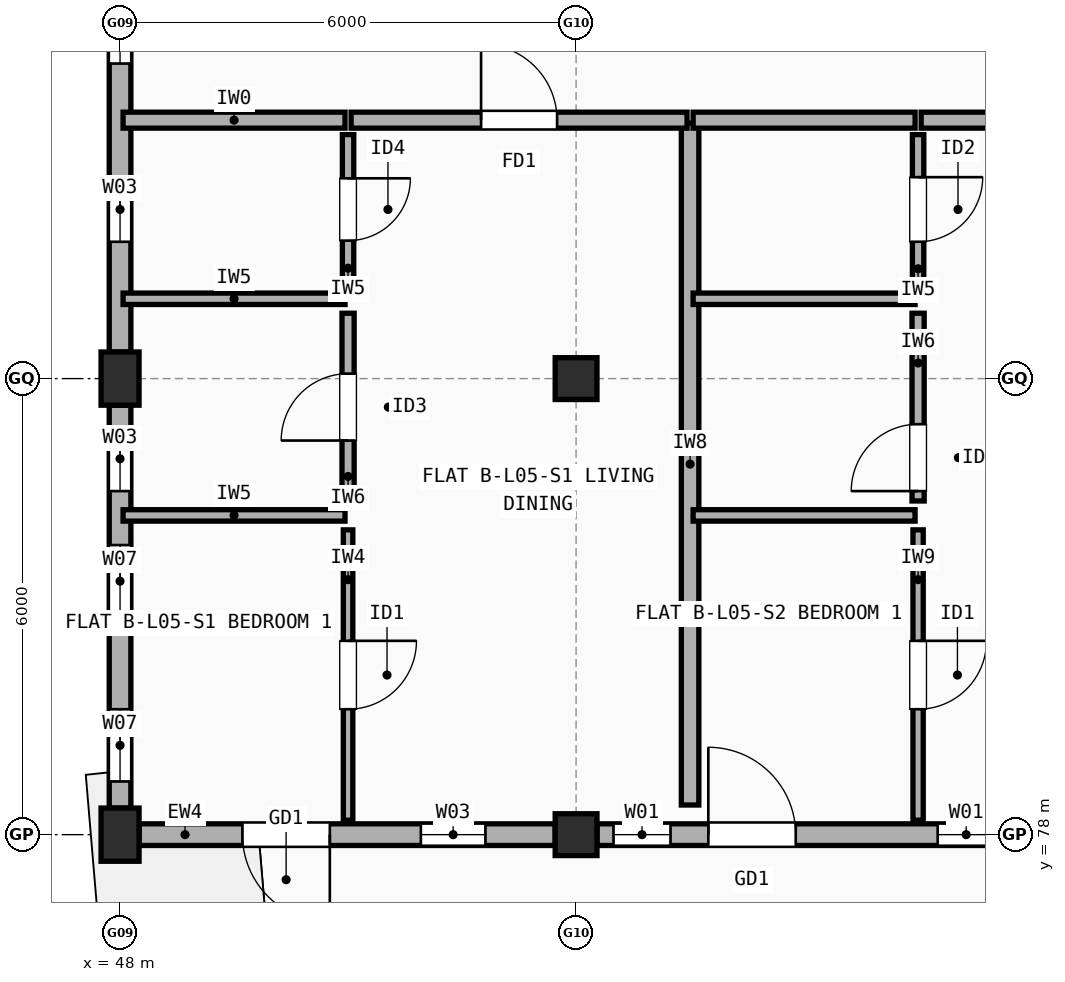
"""IFC4 building model, lengths in metres.
Left out: names, types, materials, properties, quantities, classifications, styles, units other than length and angle.
Written with IfcOpenShell. Run it as: python <this file> out.ifc"""

import sys

from ifc_helpers import new_model, si_unit, direction, frame, frame_2d, origin, origin_2d, place, context, subcontext, project, spatial, rectangle, extrude, element, fill, save


model = new_model("IFC4")
c1 = context("Model", 3, precision=1e-05, world=origin(), true_north=direction((0.0, 1.0)))
c2 = subcontext(c1, "Body", "Model", "MODEL_VIEW")
j1 = project(units=[si_unit("LENGTHUNIT", "METRE"), si_unit("PLANEANGLEUNIT", "RADIAN")], contexts=[c1])
p1 = place(None, origin())
s1 = spatial("IfcSite", under=j1, at=p1, CompositionType="ELEMENT")
p2 = place(p1, origin())
s2 = spatial("IfcBuilding", under=s1, at=p2, CompositionType="ELEMENT")
p3 = place(p2, frame((0.0, 0.0, 17.3)))
s3 = spatial("IfcBuildingStorey", under=s2, at=p3, CompositionType="ELEMENT", Elevation=17.3)
for number, where, z_axis, x_axis in (
    (1, (48.0, 78.0, 0.0), (0.0, 0.0, 1.0), (1.0, 0.0, 0.0)),
    (2, (48.0, 84.0, 0.0), (0.0, 0.0, 1.0), (1.0, 0.0, 0.0)),
):
    element("IfcColumn", number, at=place(p3, frame(where, z_axis=z_axis, x_axis=x_axis)), inside=s3, PredefinedType="COLUMN", context=c2, shape_type="SweptSolid", body=[
        extrude(rectangle(XDim=0.5, YDim=0.7, at=origin_2d()), origin(), (0.0, 0.0, 1.0), 2.965),
    ])
for number, where, z_axis, x_axis in (
    (3, (54.0, 78.0, 0.0), (0.0, 0.0, 1.0), (1.0, 0.0, 0.0)),
    (4, (54.0, 84.0, 0.0), (0.0, 0.0, 1.0), (1.0, 0.0, 0.0)),
):
    element("IfcColumn", number, at=place(p3, frame(where, z_axis=z_axis, x_axis=x_axis)), inside=s3, PredefinedType="COLUMN", context=c2, shape_type="SweptSolid", body=[
        extrude(rectangle(XDim=0.55, YDim=0.55, at=origin_2d()), origin(), (0.0, 0.0, 1.0), 2.965),
    ])
p4 = place(p3, frame((48.25, 78.0, 0.0), z_axis=(0.0, 0.0, 1.0), x_axis=(1.0, 0.0, 0.0)))
e5 = element("IfcWall", 5, at=p4, inside=s3, PredefinedType="STANDARD", context=c2, shape_type="SweptSolid", body=[
    extrude(rectangle(XDim=5.475, YDim=0.285, at=frame_2d((2.738, 0.0))), origin(), (0.0, 0.0, 1.0), 2.447),
])
p5 = place(p4, frame((1.36, 0.0, 0.0)))
e6 = element("IfcOpeningElement", 6, at=p5, cuts=e5, PredefinedType="OPENING", context=c2, shape_type="SweptSolid", body=[
    extrude(rectangle(XDim=1.15, YDim=2.15, at=frame_2d((0.575, 1.075))), frame((0.0, 0.152, 0.0), z_axis=(0.0, -1.0, 0.0), x_axis=(1.0, 0.0, 0.0)), (0.0, 0.0, 1.0), 0.305),
])
p6 = place(p4, frame((3.708, 0.0, 0.9)))
e7 = element("IfcOpeningElement", 7, at=p6, cuts=e5, PredefinedType="OPENING", context=c2, shape_type="SweptSolid", body=[
    extrude(rectangle(XDim=0.85, YDim=1.25, at=frame_2d((0.425, 0.625))), frame((0.0, 0.152, 0.0), z_axis=(0.0, -1.0, 0.0), x_axis=(1.0, 0.0, 0.0)), (0.0, 0.0, 1.0), 0.305),
])
p7 = place(p3, frame((54.275, 78.0, 0.0), z_axis=(0.0, 0.0, 1.0), x_axis=(1.0, 0.0, 0.0)))
e8 = element("IfcWall", 8, at=p7, inside=s3, PredefinedType="STANDARD", context=c2, shape_type="SweptSolid", body=[
    extrude(rectangle(XDim=5.45, YDim=0.285, at=frame_2d((2.725, 0.0))), origin(), (0.0, 0.0, 1.0), 2.447),
])
p8 = place(p7, frame((1.465, 0.0, 0.0)))
e9 = element("IfcOpeningElement", 9, at=p8, cuts=e8, PredefinedType="OPENING", context=c2, shape_type="SweptSolid", body=[
    extrude(rectangle(XDim=1.15, YDim=2.15, at=frame_2d((0.575, 1.075))), frame((0.0, 0.152, 0.0), z_axis=(0.0, -1.0, 0.0), x_axis=(1.0, 0.0, 0.0)), (0.0, 0.0, 1.0), 0.305),
])
p9 = place(p7, frame((0.218, 0.0, 0.9)))
e10 = element("IfcOpeningElement", 10, at=p9, cuts=e8, PredefinedType="OPENING", context=c2, shape_type="SweptSolid", body=[
    extrude(rectangle(XDim=0.75, YDim=1.15, at=frame_2d((0.375, 0.575))), frame((0.0, 0.152, 0.0), z_axis=(0.0, -1.0, 0.0), x_axis=(1.0, 0.0, 0.0)), (0.0, 0.0, 1.0), 0.305),
])
p10 = place(p7, frame((4.482, 0.0, 0.9)))
e11 = element("IfcOpeningElement", 11, at=p10, cuts=e8, PredefinedType="OPENING", context=c2, shape_type="SweptSolid", body=[
    extrude(rectangle(XDim=0.75, YDim=1.15, at=frame_2d((0.375, 0.575))), frame((0.0, 0.152, 0.0), z_axis=(0.0, -1.0, 0.0), x_axis=(1.0, 0.0, 0.0)), (0.0, 0.0, 1.0), 0.305),
])
p11 = place(p3, frame((48.0, 89.65, 0.0), z_axis=(0.0, 0.0, 1.0), x_axis=(0.0, -1.0, 0.0)))
e12 = element("IfcWall", 12, at=p11, inside=s3, PredefinedType="STANDARD", context=c2, shape_type="SweptSolid", body=[
    extrude(rectangle(XDim=5.3, YDim=0.285, at=frame_2d((2.65, 0.0))), origin(), (0.0, 0.0, 1.0), 2.447),
])
p12 = place(p11, frame((0.705, 0.0, 0.9)))
e13 = element("IfcOpeningElement", 13, at=p12, cuts=e12, PredefinedType="OPENING", context=c2, shape_type="SweptSolid", body=[
    extrude(rectangle(XDim=0.8, YDim=1.2, at=frame_2d((0.4, 0.6))), frame((0.0, 0.152, 0.0), z_axis=(0.0, -1.0, 0.0), x_axis=(1.0, 0.0, 0.0)), (0.0, 0.0, 1.0), 0.305),
])
p13 = place(p11, frame((3.0, 0.0, 0.9)))
e14 = element("IfcOpeningElement", 14, at=p13, cuts=e12, PredefinedType="OPENING", context=c2, shape_type="SweptSolid", body=[
    extrude(rectangle(XDim=0.85, YDim=1.25, at=frame_2d((0.425, 0.625))), frame((0.0, 0.152, 0.0), z_axis=(0.0, -1.0, 0.0), x_axis=(1.0, 0.0, 0.0)), (0.0, 0.0, 1.0), 0.305),
])
p14 = place(p3, frame((48.0, 83.65, 0.0), z_axis=(0.0, 0.0, 1.0), x_axis=(0.0, -1.0, 0.0)))
e15 = element("IfcWall", 15, at=p14, inside=s3, PredefinedType="STANDARD", context=c2, shape_type="SweptSolid", body=[
    extrude(rectangle(XDim=5.3, YDim=0.285, at=frame_2d((2.65, 0.0))), origin(), (0.0, 0.0, 1.0), 2.447),
])
p15 = place(p14, frame((0.28, 0.0, 0.9)))
e16 = element("IfcOpeningElement", 16, at=p15, cuts=e15, PredefinedType="OPENING", context=c2, shape_type="SweptSolid", body=[
    extrude(rectangle(XDim=0.85, YDim=1.25, at=frame_2d((0.425, 0.625))), frame((0.0, 0.152, 0.0), z_axis=(0.0, -1.0, 0.0), x_axis=(1.0, 0.0, 0.0)), (0.0, 0.0, 1.0), 0.305),
])
p16 = place(p14, frame((1.84, 0.0, 0.9)))
e17 = element("IfcOpeningElement", 17, at=p16, cuts=e15, PredefinedType="OPENING", context=c2, shape_type="SweptSolid", body=[
    extrude(rectangle(XDim=0.95, YDim=1.35, at=frame_2d((0.475, 0.675))), frame((0.0, 0.152, 0.0), z_axis=(0.0, -1.0, 0.0), x_axis=(1.0, 0.0, 0.0)), (0.0, 0.0, 1.0), 0.305),
])
p17 = place(p14, frame((4.0, 0.0, 0.9)))
e18 = element("IfcOpeningElement", 18, at=p17, cuts=e15, PredefinedType="OPENING", context=c2, shape_type="SweptSolid", body=[
    extrude(rectangle(XDim=0.95, YDim=1.35, at=frame_2d((0.475, 0.675))), frame((0.0, 0.152, 0.0), z_axis=(0.0, -1.0, 0.0), x_axis=(1.0, 0.0, 0.0)), (0.0, 0.0, 1.0), 0.305),
])
p18 = place(p3, frame((55.5, 78.39, 0.0), z_axis=(0.0, 0.0, 1.0), x_axis=(0.0, 1.0, 0.0)))
e19 = element("IfcWall", 19, at=p18, inside=s3, PredefinedType="SOLIDWALL", context=c2, shape_type="SweptSolid", body=[
    extrude(rectangle(XDim=8.97, YDim=0.23, at=frame_2d((4.485, 0.0))), origin(), (0.0, 0.0, 1.0), 2.447),
])
p19 = place(p3, frame((48.04, 87.4, 0.0), z_axis=(0.0, 0.0, 1.0), x_axis=(1.0, 0.0, 0.0)))
e20 = element("IfcWall", 20, at=p19, inside=s3, PredefinedType="SOLIDWALL", context=c2, shape_type="SweptSolid", body=[
    extrude(rectangle(XDim=2.92, YDim=0.21, at=frame_2d((1.46, 0.0))), origin(), (0.0, 0.0, 1.0), 2.447),
])
p20 = place(p3, frame((51.04, 87.4, 0.0), z_axis=(0.0, 0.0, 1.0), x_axis=(1.0, 0.0, 0.0)))
e21 = element("IfcWall", 21, at=p20, inside=s3, PredefinedType="SOLIDWALL", context=c2, shape_type="SweptSolid", body=[
    extrude(rectangle(XDim=4.42, YDim=0.21, at=frame_2d((2.21, 0.0))), origin(), (0.0, 0.0, 1.0), 2.548),
])
p21 = place(p20, frame((1.71, 0.0, 0.0)))
e22 = element("IfcOpeningElement", 22, at=p21, cuts=e21, PredefinedType="OPENING", context=c2, shape_type="SweptSolid", body=[
    extrude(rectangle(XDim=1.0, YDim=2.15, at=frame_2d((0.5, 1.075))), frame((0.0, 0.115, 0.0), z_axis=(0.0, -1.0, 0.0), x_axis=(1.0, 0.0, 0.0)), (0.0, 0.0, 1.0), 0.23),
])
p22 = place(p3, frame((51.0, 78.19, 0.0), z_axis=(0.0, 0.0, 1.0), x_axis=(0.0, 1.0, 0.0)))
e23 = element("IfcWall", 23, at=p22, inside=s3, PredefinedType="PARTITIONING", context=c2, shape_type="SweptSolid", body=[
    extrude(rectangle(XDim=3.82, YDim=0.125, at=frame_2d((1.91, 0.0))), origin(), (0.0, 0.0, 1.0), 2.965),
])
p23 = place(p22, frame((1.46, 0.0, 0.0)))
e24 = element("IfcOpeningElement", 24, at=p23, cuts=e23, PredefinedType="OPENING", context=c2, shape_type="SweptSolid", body=[
    extrude(rectangle(XDim=0.9, YDim=2.1, at=frame_2d((0.45, 1.05))), frame((0.0, 0.073, 0.0), z_axis=(0.0, -1.0, 0.0), x_axis=(1.0, 0.0, 0.0)), (0.0, 0.0, 1.0), 0.145),
])
p24 = place(p3, frame((51.0, 82.39, 0.0), z_axis=(0.0, 0.0, 1.0), x_axis=(0.0, 1.0, 0.0)))
e25 = element("IfcWall", 25, at=p24, inside=s3, PredefinedType="PLUMBINGWALL", context=c2, shape_type="SweptSolid", body=[
    extrude(rectangle(XDim=2.47, YDim=0.16, at=frame_2d((1.235, 0.0))), origin(), (0.0, 0.0, 1.0), 2.447),
])
p25 = place(p24, frame((0.795, 0.0, 0.0)))
e26 = element("IfcOpeningElement", 26, at=p25, cuts=e25, PredefinedType="OPENING", context=c2, shape_type="SweptSolid", body=[
    extrude(rectangle(XDim=0.88, YDim=2.1, at=frame_2d((0.44, 1.05))), frame((0.0, 0.09, 0.0), z_axis=(0.0, -1.0, 0.0), x_axis=(1.0, 0.0, 0.0)), (0.0, 0.0, 1.0), 0.18),
])
p26 = place(p3, frame((51.0, 85.24, 0.0), z_axis=(0.0, 0.0, 1.0), x_axis=(0.0, 1.0, 0.0)))
e27 = element("IfcWall", 27, at=p26, inside=s3, PredefinedType="PARTITIONING", context=c2, shape_type="SweptSolid", body=[
    extrude(rectangle(XDim=1.97, YDim=0.15, at=frame_2d((0.985, 0.0))), origin(), (0.0, 0.0, 1.0), 2.965),
])
p27 = place(p26, frame((0.575, 0.0, 0.0)))
e28 = element("IfcOpeningElement", 28, at=p27, cuts=e27, PredefinedType="OPENING", context=c2, shape_type="SweptSolid", body=[
    extrude(rectangle(XDim=0.82, YDim=2.08, at=frame_2d((0.41, 1.04))), frame((0.0, 0.085, 0.0), z_axis=(0.0, -1.0, 0.0), x_axis=(1.0, 0.0, 0.0)), (0.0, 0.0, 1.0), 0.17),
])
for number, where, z_axis, x_axis in (
    (29, (48.04, 82.2, 0.0), (0.0, 0.0, 1.0), (1.0, 0.0, 0.0)),
    (30, (48.04, 85.05, 0.0), (0.0, 0.0, 1.0), (1.0, 0.0, 0.0)),
):
    element("IfcWall", number, at=place(p3, frame(where, z_axis=z_axis, x_axis=x_axis)), inside=s3, PredefinedType="PARTITIONING", context=c2, shape_type="SweptSolid", body=[
        extrude(rectangle(XDim=2.92, YDim=0.15, at=frame_2d((1.46, 0.0))), origin(), (0.0, 0.0, 1.0), 2.447),
    ])
p28 = place(p3, frame((55.54, 87.4, 0.0), z_axis=(0.0, 0.0, 1.0), x_axis=(1.0, 0.0, 0.0)))
e31 = element("IfcWall", 31, at=p28, inside=s3, PredefinedType="SOLIDWALL", context=c2, shape_type="SweptSolid", body=[
    extrude(rectangle(XDim=2.92, YDim=0.21, at=frame_2d((1.46, 0.0))), origin(), (0.0, 0.0, 1.0), 2.965),
])
p29 = place(p3, frame((58.54, 87.4, 0.0), z_axis=(0.0, 0.0, 1.0), x_axis=(1.0, 0.0, 0.0)))
e32 = element("IfcWall", 32, at=p29, inside=s3, PredefinedType="SOLIDWALL", context=c2, shape_type="SweptSolid", body=[
    extrude(rectangle(XDim=4.42, YDim=0.21, at=frame_2d((2.21, 0.0))), origin(), (0.0, 0.0, 1.0), 2.508),
])
p30 = place(p29, frame((1.72, 0.0, 0.0)))
e33 = element("IfcOpeningElement", 33, at=p30, cuts=e32, PredefinedType="OPENING", context=c2, shape_type="SweptSolid", body=[
    extrude(rectangle(XDim=0.98, YDim=2.15, at=frame_2d((0.49, 1.075))), frame((0.0, 0.115, 0.0), z_axis=(0.0, -1.0, 0.0), x_axis=(1.0, 0.0, 0.0)), (0.0, 0.0, 1.0), 0.23),
])
p31 = place(p3, frame((58.5, 78.19, 0.0), z_axis=(0.0, 0.0, 1.0), x_axis=(0.0, 1.0, 0.0)))
e34 = element("IfcWall", 34, at=p31, inside=s3, PredefinedType="PARTITIONING", context=c2, shape_type="SweptSolid", body=[
    extrude(rectangle(XDim=3.82, YDim=0.135, at=frame_2d((1.91, 0.0))), origin(), (0.0, 0.0, 1.0), 2.965),
])
p32 = place(p31, frame((1.46, 0.0, 0.0)))
e35 = element("IfcOpeningElement", 35, at=p32, cuts=e34, PredefinedType="OPENING", context=c2, shape_type="SweptSolid", body=[
    extrude(rectangle(XDim=0.9, YDim=2.1, at=frame_2d((0.45, 1.05))), frame((0.0, 0.077, 0.0), z_axis=(0.0, -1.0, 0.0), x_axis=(1.0, 0.0, 0.0)), (0.0, 0.0, 1.0), 0.155),
])
p33 = place(p3, frame((58.5, 82.39, 0.0), z_axis=(0.0, 0.0, 1.0), x_axis=(0.0, 1.0, 0.0)))
e36 = element("IfcWall", 36, at=p33, inside=s3, PredefinedType="PLUMBINGWALL", context=c2, shape_type="SweptSolid", body=[
    extrude(rectangle(XDim=2.47, YDim=0.16, at=frame_2d((1.235, 0.0))), origin(), (0.0, 0.0, 1.0), 2.447),
])
p34 = place(p33, frame((0.13, 0.0, 0.0)))
e37 = element("IfcOpeningElement", 37, at=p34, cuts=e36, PredefinedType="OPENING", context=c2, shape_type="SweptSolid", body=[
    extrude(rectangle(XDim=0.88, YDim=2.1, at=frame_2d((0.44, 1.05))), frame((0.0, 0.09, 0.0), z_axis=(0.0, -1.0, 0.0), x_axis=(1.0, 0.0, 0.0)), (0.0, 0.0, 1.0), 0.18),
])
p35 = place(p3, frame((58.5, 85.24, 0.0), z_axis=(0.0, 0.0, 1.0), x_axis=(0.0, 1.0, 0.0)))
e38 = element("IfcWall", 38, at=p35, inside=s3, PredefinedType="PARTITIONING", context=c2, shape_type="SweptSolid", body=[
    extrude(rectangle(XDim=1.97, YDim=0.15, at=frame_2d((0.985, 0.0))), origin(), (0.0, 0.0, 1.0), 2.965),
])
p36 = place(p35, frame((0.56, 0.0, 0.0)))
e39 = element("IfcOpeningElement", 39, at=p36, cuts=e38, PredefinedType="OPENING", context=c2, shape_type="SweptSolid", body=[
    extrude(rectangle(XDim=0.85, YDim=2.1, at=frame_2d((0.425, 1.05))), frame((0.0, 0.085, 0.0), z_axis=(0.0, -1.0, 0.0), x_axis=(1.0, 0.0, 0.0)), (0.0, 0.0, 1.0), 0.17),
])
for number, where, z_axis, x_axis in (
    (40, (55.54, 82.2, 0.0), (0.0, 0.0, 1.0), (1.0, 0.0, 0.0)),
    (41, (55.54, 85.05, 0.0), (0.0, 0.0, 1.0), (1.0, 0.0, 0.0)),
):
    element("IfcWall", number, at=place(p3, frame(where, z_axis=z_axis, x_axis=x_axis)), inside=s3, PredefinedType="PARTITIONING", context=c2, shape_type="SweptSolid", body=[
        extrude(rectangle(XDim=2.92, YDim=0.15, at=frame_2d((1.46, 0.0))), origin(), (0.0, 0.0, 1.0), 2.965),
    ])
p37 = place(p5, frame((1.15, 0.0, 0.0), z_axis=(0.0, 0.0, 1.0), x_axis=(-1.0, 0.0, 0.0)))
e42 = element("IfcDoor", 42, at=p37, inside=s3, OperationType="SINGLE_SWING_RIGHT", PredefinedType="DOOR", context=c2, shape_type="SweptSolid", body=[
    extrude(rectangle(XDim=1.15, YDim=2.15, at=frame_2d((0.575, 1.075))), frame((0.0, 0.025, 0.0), z_axis=(0.0, -1.0, 0.0), x_axis=(1.0, 0.0, 0.0)), (0.0, 0.0, 1.0), 0.05),
])
fill(e6, e42)
p38 = place(p6, origin())
e43 = element("IfcWindow", 43, at=p38, inside=s3, PartitioningType="SINGLE_PANEL", PredefinedType="WINDOW", context=c2, shape_type="SweptSolid", body=[
    extrude(rectangle(XDim=0.85, YDim=1.25, at=frame_2d((0.425, 0.625))), frame((0.0, 0.03, 0.0), z_axis=(0.0, -1.0, 0.0), x_axis=(1.0, 0.0, 0.0)), (0.0, 0.0, 1.0), 0.06),
])
fill(e7, e43)
p39 = place(p8, frame((1.15, 0.0, 0.0), z_axis=(0.0, 0.0, 1.0), x_axis=(-1.0, 0.0, 0.0)))
e44 = element("IfcDoor", 44, at=p39, inside=s3, OperationType="SINGLE_SWING_LEFT", PredefinedType="DOOR", context=c2, shape_type="SweptSolid", body=[
    extrude(rectangle(XDim=1.15, YDim=2.15, at=frame_2d((0.575, 1.075))), frame((0.0, 0.025, 0.0), z_axis=(0.0, -1.0, 0.0), x_axis=(1.0, 0.0, 0.0)), (0.0, 0.0, 1.0), 0.05),
])
fill(e9, e44)
p40 = place(p9, origin())
e45 = element("IfcWindow", 45, at=p40, inside=s3, PartitioningType="SINGLE_PANEL", PredefinedType="WINDOW", context=c2, shape_type="SweptSolid", body=[
    extrude(rectangle(XDim=0.75, YDim=1.15, at=frame_2d((0.375, 0.575))), frame((0.0, 0.03, 0.0), z_axis=(0.0, -1.0, 0.0), x_axis=(1.0, 0.0, 0.0)), (0.0, 0.0, 1.0), 0.06),
])
fill(e10, e45)
p41 = place(p10, origin())
e46 = element("IfcWindow", 46, at=p41, inside=s3, PartitioningType="SINGLE_PANEL", PredefinedType="WINDOW", context=c2, shape_type="SweptSolid", body=[
    extrude(rectangle(XDim=0.75, YDim=1.15, at=frame_2d((0.375, 0.575))), frame((0.0, 0.03, 0.0), z_axis=(0.0, -1.0, 0.0), x_axis=(1.0, 0.0, 0.0)), (0.0, 0.0, 1.0), 0.06),
])
fill(e11, e46)
p42 = place(p12, origin())
e47 = element("IfcWindow", 47, at=p42, inside=s3, PartitioningType="SINGLE_PANEL", PredefinedType="WINDOW", context=c2, shape_type="SweptSolid", body=[
    extrude(rectangle(XDim=0.8, YDim=1.2, at=frame_2d((0.4, 0.6))), frame((0.0, 0.03, 0.0), z_axis=(0.0, -1.0, 0.0), x_axis=(1.0, 0.0, 0.0)), (0.0, 0.0, 1.0), 0.06),
])
fill(e13, e47)
p43 = place(p13, origin())
e48 = element("IfcWindow", 48, at=p43, inside=s3, PartitioningType="SINGLE_PANEL", PredefinedType="WINDOW", context=c2, shape_type="SweptSolid", body=[
    extrude(rectangle(XDim=0.85, YDim=1.25, at=frame_2d((0.425, 0.625))), frame((0.0, 0.03, 0.0), z_axis=(0.0, -1.0, 0.0), x_axis=(1.0, 0.0, 0.0)), (0.0, 0.0, 1.0), 0.06),
])
fill(e14, e48)
p44 = place(p15, origin())
e49 = element("IfcWindow", 49, at=p44, inside=s3, PartitioningType="SINGLE_PANEL", PredefinedType="WINDOW", context=c2, shape_type="SweptSolid", body=[
    extrude(rectangle(XDim=0.85, YDim=1.25, at=frame_2d((0.425, 0.625))), frame((0.0, 0.03, 0.0), z_axis=(0.0, -1.0, 0.0), x_axis=(1.0, 0.0, 0.0)), (0.0, 0.0, 1.0), 0.06),
])
fill(e16, e49)
p45 = place(p16, origin())
e50 = element("IfcWindow", 50, at=p45, inside=s3, PartitioningType="SINGLE_PANEL", PredefinedType="WINDOW", context=c2, shape_type="SweptSolid", body=[
    extrude(rectangle(XDim=0.95, YDim=1.35, at=frame_2d((0.475, 0.675))), frame((0.0, 0.03, 0.0), z_axis=(0.0, -1.0, 0.0), x_axis=(1.0, 0.0, 0.0)), (0.0, 0.0, 1.0), 0.06),
])
fill(e17, e50)
p46 = place(p17, origin())
e51 = element("IfcWindow", 51, at=p46, inside=s3, PartitioningType="SINGLE_PANEL", PredefinedType="WINDOW", context=c2, shape_type="SweptSolid", body=[
    extrude(rectangle(XDim=0.95, YDim=1.35, at=frame_2d((0.475, 0.675))), frame((0.0, 0.03, 0.0), z_axis=(0.0, -1.0, 0.0), x_axis=(1.0, 0.0, 0.0)), (0.0, 0.0, 1.0), 0.06),
])
fill(e18, e51)
p47 = place(p21, origin())
e52 = element("IfcDoor", 52, at=p47, inside=s3, OperationType="SINGLE_SWING_LEFT", PredefinedType="DOOR", context=c2, shape_type="SweptSolid", body=[
    extrude(rectangle(XDim=1.0, YDim=2.15, at=frame_2d((0.5, 1.075))), frame((0.0, 0.025, 0.0), z_axis=(0.0, -1.0, 0.0), x_axis=(1.0, 0.0, 0.0)), (0.0, 0.0, 1.0), 0.05),
])
fill(e22, e52)
p48 = place(p23, origin())
e53 = element("IfcDoor", 53, at=p48, inside=s3, OperationType="SINGLE_SWING_RIGHT", PredefinedType="DOOR", context=c2, shape_type="SweptSolid", body=[
    extrude(rectangle(XDim=0.9, YDim=2.1, at=frame_2d((0.45, 1.05))), frame((0.0, 0.025, 0.0), z_axis=(0.0, -1.0, 0.0), x_axis=(1.0, 0.0, 0.0)), (0.0, 0.0, 1.0), 0.05),
])
fill(e24, e53)
p49 = place(p25, origin())
e54 = element("IfcDoor", 54, at=p49, inside=s3, OperationType="SINGLE_SWING_LEFT", PredefinedType="DOOR", context=c2, shape_type="SweptSolid", body=[
    extrude(rectangle(XDim=0.88, YDim=2.1, at=frame_2d((0.44, 1.05))), frame((0.0, 0.025, 0.0), z_axis=(0.0, -1.0, 0.0), x_axis=(1.0, 0.0, 0.0)), (0.0, 0.0, 1.0), 0.05),
])
fill(e26, e54)
p50 = place(p27, origin())
e55 = element("IfcDoor", 55, at=p50, inside=s3, OperationType="SINGLE_SWING_RIGHT", PredefinedType="DOOR", context=c2, shape_type="SweptSolid", body=[
    extrude(rectangle(XDim=0.82, YDim=2.08, at=frame_2d((0.41, 1.04))), frame((0.0, 0.025, 0.0), z_axis=(0.0, -1.0, 0.0), x_axis=(1.0, 0.0, 0.0)), (0.0, 0.0, 1.0), 0.05),
])
fill(e28, e55)
p51 = place(p32, origin())
e56 = element("IfcDoor", 56, at=p51, inside=s3, OperationType="SINGLE_SWING_RIGHT", PredefinedType="DOOR", context=c2, shape_type="SweptSolid", body=[
    extrude(rectangle(XDim=0.9, YDim=2.1, at=frame_2d((0.45, 1.05))), frame((0.0, 0.025, 0.0), z_axis=(0.0, -1.0, 0.0), x_axis=(1.0, 0.0, 0.0)), (0.0, 0.0, 1.0), 0.05),
])
fill(e35, e56)
p52 = place(p34, origin())
e57 = element("IfcDoor", 57, at=p52, inside=s3, OperationType="SINGLE_SWING_LEFT", PredefinedType="DOOR", context=c2, shape_type="SweptSolid", body=[
    extrude(rectangle(XDim=0.88, YDim=2.1, at=frame_2d((0.44, 1.05))), frame((0.0, 0.025, 0.0), z_axis=(0.0, -1.0, 0.0), x_axis=(1.0, 0.0, 0.0)), (0.0, 0.0, 1.0), 0.05),
])
fill(e37, e57)
p53 = place(p36, origin())
e58 = element("IfcDoor", 58, at=p53, inside=s3, OperationType="SINGLE_SWING_RIGHT", PredefinedType="DOOR", context=c2, shape_type="SweptSolid", body=[
    extrude(rectangle(XDim=0.85, YDim=2.1, at=frame_2d((0.425, 1.05))), frame((0.0, 0.025, 0.0), z_axis=(0.0, -1.0, 0.0), x_axis=(1.0, 0.0, 0.0)), (0.0, 0.0, 1.0), 0.05),
])
fill(e39, e58)
save(model, sys.argv[1])
